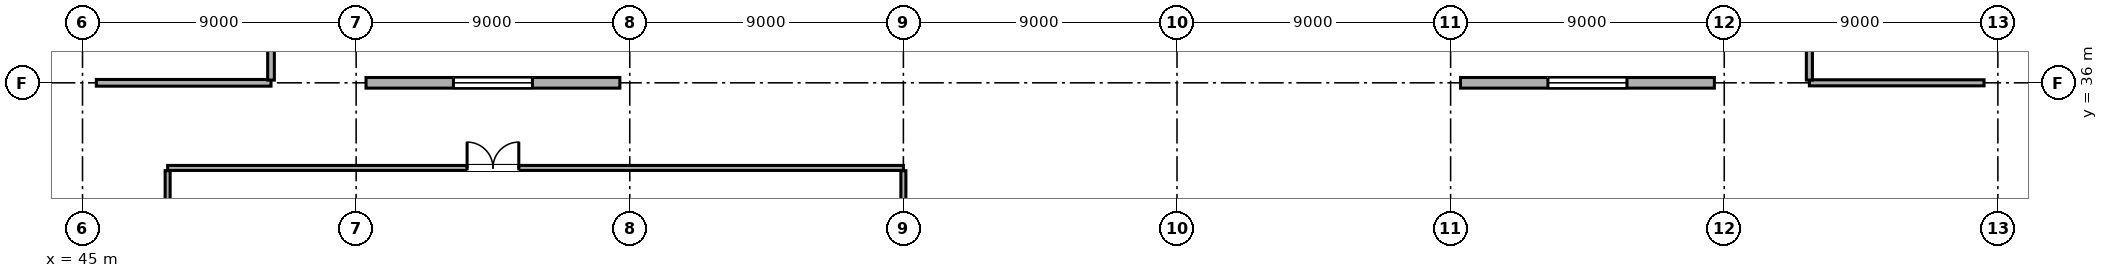
"""IFC4 building model, lengths in metres.
Left out: names, types, materials, properties, quantities, classifications, styles, units other than length and angle.
Written with IfcOpenShell. Run it as: python <this file> out.ifc"""

import sys

from ifc_helpers import new_model, si_unit, direction, frame, frame_2d, origin, origin_2d, place, context, subcontext, project, spatial, rectangle, hollow_rectangle, extrude, element, fill, save


model = new_model("IFC4")
c1 = context("Model", 3, precision=1e-05, world=origin(), true_north=direction((0.0, 1.0)))
c2 = subcontext(c1, "Body", "Model", "MODEL_VIEW")
j1 = project(units=[si_unit("LENGTHUNIT", "METRE"), si_unit("PLANEANGLEUNIT", "RADIAN")], contexts=[c1])
p1 = place(None, origin())
s1 = spatial("IfcSite", under=j1, at=p1, CompositionType="ELEMENT")
p2 = place(p1, origin())
s2 = spatial("IfcBuilding", under=s1, at=p2, CompositionType="ELEMENT")
p3 = place(p2, origin())
s3 = spatial("IfcBuildingStorey", under=s2, at=p3, CompositionType="ELEMENT", Elevation=0.0)
p4 = place(p3, frame((45.0, 36.0, 0.0), z_axis=(0.0, 0.0, 1.0), x_axis=(1.0, 0.0, 0.0)))
e1 = element("IfcColumn", 1, at=p4, inside=s3, PredefinedType="COLUMN", context=c2, shape_type="SweptSolid", body=[
    extrude(hollow_rectangle(XDim=0.5, YDim=0.5, WallThickness=0.022, at=origin_2d()), origin(), (0.0, 0.0, 1.0), 4.8),
])
for number, where, z_axis, x_axis in (
    (2, (54.0, 36.0, 0.0), (0.0, 0.0, 1.0), (1.0, 0.0, 0.0)),
    (3, (63.0, 36.0, 0.0), (0.0, 0.0, 1.0), (1.0, 0.0, 0.0)),
    (4, (72.0, 36.0, 0.0), (0.0, 0.0, 1.0), (1.0, 0.0, 0.0)),
    (5, (81.0, 36.0, 0.0), (0.0, 0.0, 1.0), (1.0, 0.0, 0.0)),
    (6, (90.0, 36.0, 0.0), (0.0, 0.0, 1.0), (1.0, 0.0, 0.0)),
    (7, (99.0, 36.0, 0.0), (0.0, 0.0, 1.0), (1.0, 0.0, 0.0)),
):
    element("IfcColumn", number, at=place(p3, frame(where, z_axis=z_axis, x_axis=x_axis)), inside=s3, PredefinedType="COLUMN", context=c2, shape_type="SweptSolid", body=[
        extrude(hollow_rectangle(XDim=0.65, YDim=0.65, WallThickness=0.025, at=origin_2d()), origin(), (0.0, 0.0, 1.0), 4.8),
    ])
p5 = place(p3, frame((108.0, 36.0, 0.0), z_axis=(0.0, 0.0, 1.0), x_axis=(1.0, 0.0, 0.0)))
e8 = element("IfcColumn", 8, at=p5, inside=s3, PredefinedType="COLUMN", context=c2, shape_type="SweptSolid", body=[
    extrude(hollow_rectangle(XDim=0.5, YDim=0.5, WallThickness=0.022, at=origin_2d()), origin(), (0.0, 0.0, 1.0), 4.8),
])
p6 = place(p3, frame((62.675, 36.0, 0.0), z_axis=(0.0, 0.0, 1.0), x_axis=(-1.0, 0.0, 0.0)))
e9 = element("IfcWall", 9, at=p6, inside=s3, PredefinedType="STANDARD", context=c2, shape_type="SweptSolid", body=[
    extrude(rectangle(XDim=8.35, YDim=0.35, at=frame_2d((4.175, 0.0))), origin(), (0.0, 0.0, 1.0), 4.055),
])
p7 = place(p6, frame((2.875, 0.0, 0.85)))
e10 = element("IfcOpeningElement", 10, at=p7, cuts=e9, PredefinedType="OPENING", context=c2, shape_type="SweptSolid", body=[
    extrude(rectangle(XDim=2.6, YDim=1.6, at=frame_2d((1.3, 0.8))), frame((0.0, 0.187, 0.0), z_axis=(0.0, -1.0, 0.0), x_axis=(1.0, 0.0, 0.0)), (0.0, 0.0, 1.0), 0.374),
])
p8 = place(p3, frame((98.675, 36.0, 0.0), z_axis=(0.0, 0.0, 1.0), x_axis=(-1.0, 0.0, 0.0)))
e11 = element("IfcWall", 11, at=p8, inside=s3, PredefinedType="STANDARD", context=c2, shape_type="SweptSolid", body=[
    extrude(rectangle(XDim=8.35, YDim=0.35, at=frame_2d((4.175, 0.0))), origin(), (0.0, 0.0, 1.0), 4.055),
])
p9 = place(p8, frame((2.875, 0.0, 0.85)))
e12 = element("IfcOpeningElement", 12, at=p9, cuts=e11, PredefinedType="OPENING", context=c2, shape_type="SweptSolid", body=[
    extrude(rectangle(XDim=2.6, YDim=1.6, at=frame_2d((1.3, 0.8))), frame((0.0, 0.187, 0.0), z_axis=(0.0, -1.0, 0.0), x_axis=(1.0, 0.0, 0.0)), (0.0, 0.0, 1.0), 0.374),
])
p10 = place(p3, frame((47.8, 33.2, 0.0), z_axis=(0.0, 0.0, 1.0), x_axis=(1.0, 0.0, 0.0)))
e13 = element("IfcWall", 13, at=p10, inside=s3, PredefinedType="PARTITIONING", context=c2, shape_type="SweptSolid", body=[
    extrude(rectangle(XDim=24.2, YDim=0.165, at=frame_2d((12.1, 0.0))), origin(), (0.0, 0.0, 1.0), 4.555),
])
p11 = place(p10, frame((9.85, 0.0, 0.0)))
e14 = element("IfcOpeningElement", 14, at=p11, cuts=e13, PredefinedType="OPENING", context=c2, shape_type="SweptSolid", body=[
    extrude(rectangle(XDim=1.7, YDim=2.12, at=frame_2d((0.85, 1.06))), frame((0.0, 0.094, 0.0), z_axis=(0.0, -1.0, 0.0), x_axis=(1.0, 0.0, 0.0)), (0.0, 0.0, 1.0), 0.189),
])
p12 = place(p3, frame((47.8, 21.635, 0.0), z_axis=(0.0, 0.0, 1.0), x_axis=(0.0, 1.0, 0.0)))
e15 = element("IfcWall", 15, at=p12, inside=s3, PredefinedType="PARTITIONING", context=c2, shape_type="SweptSolid", body=[
    extrude(rectangle(XDim=11.475, YDim=0.165, at=frame_2d((5.738, 0.0))), origin(), (0.0, 0.0, 1.0), 4.555),
])
p13 = place(p3, frame((72.0, 22.2, 0.0), z_axis=(0.0, 0.0, 1.0), x_axis=(0.0, 1.0, 0.0)))
e16 = element("IfcWall", 16, at=p13, inside=s3, PredefinedType="PARTITIONING", context=c2, shape_type="SweptSolid", body=[
    extrude(rectangle(XDim=10.91, YDim=0.165, at=frame_2d((5.455, 0.0))), origin(), (0.0, 0.0, 1.0), 3.835),
])
p14 = place(p3, frame((45.455, 36.0, 0.0), z_axis=(0.0, 0.0, 1.0), x_axis=(1.0, 0.0, 0.0)))
e17 = element("IfcWall", 17, at=p14, inside=s3, PredefinedType="PARTITIONING", context=c2, shape_type="SweptSolid", body=[
    extrude(rectangle(XDim=5.745, YDim=0.22, at=frame_2d((2.873, 0.0))), origin(), (0.0, 0.0, 1.0), 3.835),
])
p15 = place(p3, frame((51.2, 36.09, 0.0), z_axis=(0.0, 0.0, 1.0), x_axis=(0.0, 1.0, 0.0)))
e18 = element("IfcWall", 18, at=p15, inside=s3, PredefinedType="PARTITIONING", context=c2, shape_type="SweptSolid", body=[
    extrude(rectangle(XDim=28.62, YDim=0.22, at=frame_2d((14.31, 0.0))), origin(), (0.0, 0.0, 1.0), 4.555),
])
p16 = place(p15, frame((15.11, 0.0, 0.0)))
e19 = element("IfcOpeningElement", 19, at=p16, cuts=e18, PredefinedType="OPENING", context=c2, shape_type="SweptSolid", body=[
    extrude(rectangle(XDim=1.75, YDim=2.12, at=frame_2d((0.875, 1.06))), frame((0.0, 0.122, 0.0), z_axis=(0.0, -1.0, 0.0), x_axis=(1.0, 0.0, 0.0)), (0.0, 0.0, 1.0), 0.244),
])
p17 = place(p3, frame((101.8, 36.0, 0.0), z_axis=(0.0, 0.0, 1.0), x_axis=(1.0, 0.0, 0.0)))
e20 = element("IfcWall", 20, at=p17, inside=s3, PredefinedType="PARTITIONING", context=c2, shape_type="SweptSolid", body=[
    extrude(rectangle(XDim=5.745, YDim=0.2, at=frame_2d((2.873, 0.0))), origin(), (0.0, 0.0, 1.0), 3.835),
])
p18 = place(p3, frame((101.8, 36.09, 0.0), z_axis=(0.0, 0.0, 1.0), x_axis=(0.0, 1.0, 0.0)))
e21 = element("IfcWall", 21, at=p18, inside=s3, PredefinedType="PARTITIONING", context=c2, shape_type="SweptSolid", body=[
    extrude(rectangle(XDim=28.62, YDim=0.2, at=frame_2d((14.31, 0.0))), origin(), (0.0, 0.0, 1.0), 4.555),
])
p19 = place(p18, frame((15.11, 0.0, 0.0)))
e22 = element("IfcOpeningElement", 22, at=p19, cuts=e21, PredefinedType="OPENING", context=c2, shape_type="SweptSolid", body=[
    extrude(rectangle(XDim=1.6, YDim=2.12, at=frame_2d((0.8, 1.06))), frame((0.0, 0.112, 0.0), z_axis=(0.0, -1.0, 0.0), x_axis=(1.0, 0.0, 0.0)), (0.0, 0.0, 1.0), 0.224),
])
p20 = place(p7, origin())
e23 = element("IfcWindow", 23, at=p20, inside=s3, PartitioningType="DOUBLE_PANEL_VERTICAL", PredefinedType="WINDOW", context=c2, shape_type="SweptSolid", body=[
    extrude(rectangle(XDim=2.6, YDim=1.6, at=frame_2d((1.3, 0.8))), frame((0.0, 0.03, 0.0), z_axis=(0.0, -1.0, 0.0), x_axis=(1.0, 0.0, 0.0)), (0.0, 0.0, 1.0), 0.06),
])
fill(e10, e23)
p21 = place(p9, origin())
e24 = element("IfcWindow", 24, at=p21, inside=s3, PartitioningType="DOUBLE_PANEL_VERTICAL", PredefinedType="WINDOW", context=c2, shape_type="SweptSolid", body=[
    extrude(rectangle(XDim=2.6, YDim=1.6, at=frame_2d((1.3, 0.8))), frame((0.0, 0.03, 0.0), z_axis=(0.0, -1.0, 0.0), x_axis=(1.0, 0.0, 0.0)), (0.0, 0.0, 1.0), 0.06),
])
fill(e12, e24)
p22 = place(p11, origin())
e25 = element("IfcDoor", 25, at=p22, inside=s3, OperationType="DOUBLE_DOOR_SINGLE_SWING", PredefinedType="DOOR", context=c2, shape_type="SweptSolid", body=[
    extrude(rectangle(XDim=1.7, YDim=2.12, at=frame_2d((0.85, 1.06))), frame((0.0, 0.025, 0.0), z_axis=(0.0, -1.0, 0.0), x_axis=(1.0, 0.0, 0.0)), (0.0, 0.0, 1.0), 0.05),
])
fill(e14, e25)
save(model, sys.argv[1])
